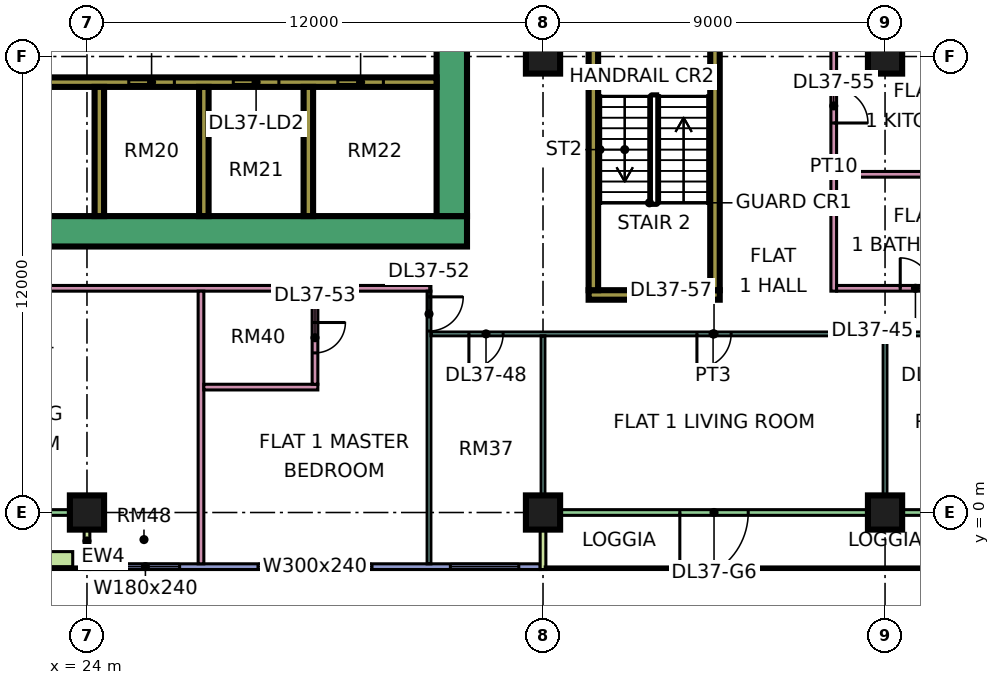
"""IFC4 building model, lengths in metres.
Left out: names, types, materials, properties, quantities, classifications, styles, units other than length and angle.
Written with IfcOpenShell. Run it as: python <this file> out.ifc"""

import sys

from ifc_helpers import new_model, si_unit, direction, frame, frame_2d, origin, origin_2d, place, context, subcontext, project, spatial, rectangle, extrude, element, fill, save


model = new_model("IFC4")
c1 = context("Model", 3, precision=1e-05, world=origin(), true_north=direction((0.0, 1.0)))
c2 = subcontext(c1, "Body", "Model", "MODEL_VIEW")
j1 = project(units=[si_unit("LENGTHUNIT", "METRE"), si_unit("PLANEANGLEUNIT", "RADIAN")], contexts=[c1])
p1 = place(None, origin())
s1 = spatial("IfcSite", under=j1, at=p1, CompositionType="ELEMENT")
p2 = place(p1, origin())
s2 = spatial("IfcBuilding", under=s1, at=p2, CompositionType="ELEMENT")
p3 = place(p2, frame((0.0, 0.0, 164.9)))
s3 = spatial("IfcBuildingStorey", under=s2, at=p3, CompositionType="ELEMENT", Elevation=164.9)
for number, where, z_axis, x_axis in (
    (1, (24.0, 0.0, 0.0), (0.0, 0.0, 1.0), (1.0, 0.0, 0.0)),
    (2, (36.0, 0.0, 0.0), (0.0, 0.0, 1.0), (1.0, 0.0, 0.0)),
    (3, (36.0, 12.0, 0.0), (0.0, 0.0, 1.0), (1.0, 0.0, 0.0)),
    (4, (45.0, 0.0, 0.0), (0.0, 0.0, 1.0), (1.0, 0.0, 0.0)),
    (5, (45.0, 12.0, 0.0), (0.0, 0.0, 1.0), (1.0, 0.0, 0.0)),
):
    element("IfcColumn", number, at=place(p3, frame(where, z_axis=z_axis, x_axis=x_axis)), inside=s3, PredefinedType="COLUMN", context=c2, shape_type="SweptSolid", body=[
        extrude(rectangle(XDim=0.9, YDim=0.9, at=origin_2d()), origin(), (0.0, 0.0, 1.0), 3.75),
    ])
p4 = place(p3, frame((9.0, 7.4, 0.0), z_axis=(0.0, 0.0, 1.0), x_axis=(1.0, 0.0, 0.0)))
e6 = element("IfcWall", 6, at=p4, inside=s3, PredefinedType="SHEAR", context=c2, shape_type="SweptSolid", body=[
    extrude(rectangle(XDim=25.0, YDim=0.8, at=frame_2d((12.5, 0.0))), origin(), (0.0, 0.0, 1.0), 3.75),
])
p5 = place(p3, frame((33.6, 7.8, 0.0), z_axis=(0.0, 0.0, 1.0), x_axis=(0.0, 1.0, 0.0)))
e7 = element("IfcWall", 7, at=p5, inside=s3, PredefinedType="SHEAR", context=c2, shape_type="SweptSolid", body=[
    extrude(rectangle(XDim=11.4, YDim=0.8, at=frame_2d((5.7, 0.0))), origin(), (0.0, 0.0, 1.0), 3.75),
])
p6 = place(p5, frame((5.4, 0.0, 0.0)))
e8 = element("IfcOpeningElement", 8, at=p6, cuts=e7, PredefinedType="OPENING", context=c2, shape_type="SweptSolid", body=[
    extrude(rectangle(XDim=1.8, YDim=2.4, at=frame_2d((0.9, 1.2))), frame((0.0, 0.41, 0.0), z_axis=(0.0, -1.0, 0.0), x_axis=(1.0, 0.0, 0.0)), (0.0, 0.0, 1.0), 0.82),
])
p7 = place(p3, frame((13.45, 11.325, 0.0), z_axis=(0.0, 0.0, 1.0), x_axis=(1.0, 0.0, 0.0)))
e9 = element("IfcWall", 9, at=p7, inside=s3, PredefinedType="SHEAR", context=c2, shape_type="SweptSolid", body=[
    extrude(rectangle(XDim=19.75, YDim=0.25, at=frame_2d((9.875, 0.0))), origin(), (0.0, 0.0, 1.0), 3.75),
])
p8 = place(p7, frame((11.65, 0.0, 0.0)))
e10 = element("IfcOpeningElement", 10, at=p8, cuts=e9, PredefinedType="OPENING", context=c2, shape_type="SweptSolid", body=[
    extrude(rectangle(XDim=1.2, YDim=2.2, at=frame_2d((0.6, 1.1))), frame((0.0, 0.135, 0.0), z_axis=(0.0, -1.0, 0.0), x_axis=(1.0, 0.0, 0.0)), (0.0, 0.0, 1.0), 0.27),
])
p9 = place(p7, frame((14.4, 0.0, 0.0)))
e11 = element("IfcOpeningElement", 11, at=p9, cuts=e9, PredefinedType="OPENING", context=c2, shape_type="SweptSolid", body=[
    extrude(rectangle(XDim=1.2, YDim=2.2, at=frame_2d((0.6, 1.1))), frame((0.0, 0.135, 0.0), z_axis=(0.0, -1.0, 0.0), x_axis=(1.0, 0.0, 0.0)), (0.0, 0.0, 1.0), 0.27),
])
p10 = place(p7, frame((17.15, 0.0, 0.0)))
e12 = element("IfcOpeningElement", 12, at=p10, cuts=e9, PredefinedType="OPENING", context=c2, shape_type="SweptSolid", body=[
    extrude(rectangle(XDim=1.2, YDim=2.2, at=frame_2d((0.6, 1.1))), frame((0.0, 0.135, 0.0), z_axis=(0.0, -1.0, 0.0), x_axis=(1.0, 0.0, 0.0)), (0.0, 0.0, 1.0), 0.27),
])
p11 = place(p7, frame((4.925, 0.0, 0.0)))
e13 = element("IfcOpeningElement", 13, at=p11, cuts=e9, PredefinedType="OPENING", context=c2, shape_type="SweptSolid", body=[
    extrude(rectangle(XDim=0.9, YDim=2.1, at=frame_2d((0.45, 1.05))), frame((0.0, 0.135, 0.0), z_axis=(0.0, -1.0, 0.0), x_axis=(1.0, 0.0, 0.0)), (0.0, 0.0, 1.0), 0.27),
])
for number, where, z_axis, x_axis in (
    (14, (24.325, 7.8, 0.0), (0.0, 0.0, 1.0), (0.0, 1.0, 0.0)),
    (15, (27.075, 7.8, 0.0), (0.0, 0.0, 1.0), (0.0, 1.0, 0.0)),
    (16, (29.825, 7.8, 0.0), (0.0, 0.0, 1.0), (0.0, 1.0, 0.0)),
):
    element("IfcWall", number, at=place(p3, frame(where, z_axis=z_axis, x_axis=x_axis)), inside=s3, PredefinedType="SHEAR", context=c2, shape_type="SweptSolid", body=[
        extrude(rectangle(XDim=3.4, YDim=0.25, at=frame_2d((1.7, 0.0))), origin(), (0.0, 0.0, 1.0), 3.75),
    ])
p12 = place(p3, frame((37.2, 5.725, 0.0), z_axis=(0.0, 0.0, 1.0), x_axis=(1.0, 0.0, 0.0)))
e17 = element("IfcWall", 17, at=p12, inside=s3, PredefinedType="SHEAR", context=c2, shape_type="SweptSolid", body=[
    extrude(rectangle(XDim=3.45, YDim=0.25, at=frame_2d((1.725, 0.0))), origin(), (0.0, 0.0, 1.0), 3.75),
])
for number, where, z_axis, x_axis in (
    (18, (37.325, 5.85, 0.0), (0.0, 0.0, 1.0), (0.0, 1.0, 0.0)),
    (19, (40.525, 5.85, 0.0), (0.0, 0.0, 1.0), (0.0, 1.0, 0.0)),
):
    element("IfcWall", number, at=place(p3, frame(where, z_axis=z_axis, x_axis=x_axis)), inside=s3, PredefinedType="SHEAR", context=c2, shape_type="SweptSolid", body=[
        extrude(rectangle(XDim=6.5, YDim=0.25, at=frame_2d((3.25, 0.0))), origin(), (0.0, 0.0, 1.0), 3.75),
    ])
p13 = place(p3, frame((12.575, 0.0, 0.0), z_axis=(0.0, 0.0, 1.0), x_axis=(1.0, 0.0, 0.0)))
e20 = element("IfcWall", 20, at=p13, inside=s3, PredefinedType="SOLIDWALL", context=c2, shape_type="SweptSolid", body=[
    extrude(rectangle(XDim=11.35, YDim=0.15, at=frame_2d((5.675, 0.0))), origin(), (0.0, 0.0, 1.0), 3.35),
])
p14 = place(p13, frame((0.613, 0.0, 0.0)))
e21 = element("IfcOpeningElement", 21, at=p14, cuts=e20, PredefinedType="OPENING", context=c2, shape_type="SweptSolid", body=[
    extrude(rectangle(XDim=1.2, YDim=2.4, at=frame_2d((0.6, 1.2))), frame((0.0, 0.085, 0.0), z_axis=(0.0, -1.0, 0.0), x_axis=(1.0, 0.0, 0.0)), (0.0, 0.0, 1.0), 0.17),
])
p15 = place(p13, frame((3.025, 0.0, 0.45)))
e22 = element("IfcOpeningElement", 22, at=p15, cuts=e20, PredefinedType="OPENING", context=c2, shape_type="SweptSolid", body=[
    extrude(rectangle(XDim=1.8, YDim=2.4, at=frame_2d((0.9, 1.2))), frame((0.0, 0.085, 0.0), z_axis=(0.0, -1.0, 0.0), x_axis=(1.0, 0.0, 0.0)), (0.0, 0.0, 1.0), 0.17),
])
p16 = place(p13, frame((6.65, 0.0, 0.45)))
e23 = element("IfcOpeningElement", 23, at=p16, cuts=e20, PredefinedType="OPENING", context=c2, shape_type="SweptSolid", body=[
    extrude(rectangle(XDim=3.0, YDim=2.4, at=frame_2d((1.5, 1.2))), frame((0.0, 0.085, 0.0), z_axis=(0.0, -1.0, 0.0), x_axis=(1.0, 0.0, 0.0)), (0.0, 0.0, 1.0), 0.17),
])
p17 = place(p3, frame((24.0, -1.5, 0.0), z_axis=(0.0, 0.0, 1.0), x_axis=(0.0, 1.0, 0.0)))
e24 = element("IfcWall", 24, at=p17, inside=s3, PredefinedType="SOLIDWALL", context=c2, shape_type="SweptSolid", body=[
    extrude(rectangle(XDim=1.5, YDim=0.15, at=frame_2d((0.75, 0.0))), origin(), (0.0, 0.0, 1.0), 3.35),
])
p18 = place(p3, frame((24.075, -1.425, 0.0), z_axis=(0.0, 0.0, 1.0), x_axis=(1.0, 0.0, 0.0)))
e25 = element("IfcWall", 25, at=p18, inside=s3, PredefinedType="SOLIDWALL", context=c2, shape_type="SweptSolid", body=[
    extrude(rectangle(XDim=11.85, YDim=0.15, at=frame_2d((5.925, 0.0))), origin(), (0.0, 0.0, 1.0), 3.35),
])
p19 = place(p18, frame((0.562, 0.0, 0.45)))
e26 = element("IfcOpeningElement", 26, at=p19, cuts=e25, PredefinedType="OPENING", context=c2, shape_type="SweptSolid", body=[
    extrude(rectangle(XDim=1.8, YDim=2.4, at=frame_2d((0.9, 1.2))), frame((0.0, 0.085, 0.0), z_axis=(0.0, -1.0, 0.0), x_axis=(1.0, 0.0, 0.0)), (0.0, 0.0, 1.0), 0.17),
])
p20 = place(p18, frame((4.425, 0.0, 0.45)))
e27 = element("IfcOpeningElement", 27, at=p20, cuts=e25, PredefinedType="OPENING", context=c2, shape_type="SweptSolid", body=[
    extrude(rectangle(XDim=3.0, YDim=2.4, at=frame_2d((1.5, 1.2))), frame((0.0, 0.085, 0.0), z_axis=(0.0, -1.0, 0.0), x_axis=(1.0, 0.0, 0.0)), (0.0, 0.0, 1.0), 0.17),
])
p21 = place(p18, frame((9.488, 0.0, 0.45)))
e28 = element("IfcOpeningElement", 28, at=p21, cuts=e25, PredefinedType="OPENING", context=c2, shape_type="SweptSolid", body=[
    extrude(rectangle(XDim=1.8, YDim=2.4, at=frame_2d((0.9, 1.2))), frame((0.0, 0.085, 0.0), z_axis=(0.0, -1.0, 0.0), x_axis=(1.0, 0.0, 0.0)), (0.0, 0.0, 1.0), 0.17),
])
p22 = place(p3, frame((36.075, 0.0, 0.0), z_axis=(0.0, 0.0, 1.0), x_axis=(1.0, 0.0, 0.0)))
e29 = element("IfcWall", 29, at=p22, inside=s3, PredefinedType="SOLIDWALL", context=c2, shape_type="SweptSolid", body=[
    extrude(rectangle(XDim=11.85, YDim=0.15, at=frame_2d((5.925, 0.0))), origin(), (0.0, 0.0, 1.0), 3.35),
])
p23 = place(p22, frame((3.525, 0.0, 0.0)))
e30 = element("IfcOpeningElement", 30, at=p23, cuts=e29, PredefinedType="OPENING", context=c2, shape_type="SweptSolid", body=[
    extrude(rectangle(XDim=1.8, YDim=2.4, at=frame_2d((0.9, 1.2))), frame((0.0, 0.085, 0.0), z_axis=(0.0, -1.0, 0.0), x_axis=(1.0, 0.0, 0.0)), (0.0, 0.0, 1.0), 0.17),
])
p24 = place(p22, frame((10.062, 0.0, 0.45)))
e31 = element("IfcOpeningElement", 31, at=p24, cuts=e29, PredefinedType="OPENING", context=c2, shape_type="SweptSolid", body=[
    extrude(rectangle(XDim=1.2, YDim=2.4, at=frame_2d((0.6, 1.2))), frame((0.0, 0.085, 0.0), z_axis=(0.0, -1.0, 0.0), x_axis=(1.0, 0.0, 0.0)), (0.0, 0.0, 1.0), 0.17),
])
p25 = place(p3, frame((36.0, -1.5, 0.0), z_axis=(0.0, 0.0, 1.0), x_axis=(0.0, 1.0, 0.0)))
e32 = element("IfcWall", 32, at=p25, inside=s3, PredefinedType="SOLIDWALL", context=c2, shape_type="SweptSolid", body=[
    extrude(rectangle(XDim=1.5, YDim=0.15, at=frame_2d((0.75, 0.0))), origin(), (0.0, 0.0, 1.0), 3.35),
])
p26 = place(p3, frame((12.875, -1.229, 0.0), z_axis=(0.0, 0.0, 1.0), x_axis=(1.0, 0.0, 0.0)))
e33 = element("IfcWall", 33, at=p26, inside=s3, PredefinedType="SOLIDWALL", context=c2, shape_type="SweptSolid", body=[
    extrude(rectangle(XDim=10.75, YDim=0.4, at=frame_2d((5.375, 0.0))), origin(), (0.0, 0.0, 1.0), 0.7),
])
p27 = place(p3, frame((11.95, 5.9, 0.0), z_axis=(0.0, 0.0, 1.0), x_axis=(1.0, 0.0, 0.0)))
e34 = element("IfcWall", 34, at=p27, inside=s3, PredefinedType="PARTITIONING", context=c2, shape_type="SweptSolid", body=[
    extrude(rectangle(XDim=21.1, YDim=0.15, at=frame_2d((10.55, 0.0))), origin(), (0.0, 0.0, 1.0), 3.35),
])
p28 = place(p27, frame((1.1, 0.0, 0.0)))
e35 = element("IfcOpeningElement", 35, at=p28, cuts=e34, PredefinedType="OPENING", context=c2, shape_type="SweptSolid", body=[
    extrude(rectangle(XDim=0.9, YDim=2.1, at=frame_2d((0.45, 1.05))), frame((0.0, 0.085, 0.0), z_axis=(0.0, -1.0, 0.0), x_axis=(1.0, 0.0, 0.0)), (0.0, 0.0, 1.0), 0.17),
])
p29 = place(p27, frame((4.1, 0.0, 0.0)))
e36 = element("IfcOpeningElement", 36, at=p29, cuts=e34, PredefinedType="OPENING", context=c2, shape_type="SweptSolid", body=[
    extrude(rectangle(XDim=0.9, YDim=2.1, at=frame_2d((0.45, 1.05))), frame((0.0, 0.085, 0.0), z_axis=(0.0, -1.0, 0.0), x_axis=(1.0, 0.0, 0.0)), (0.0, 0.0, 1.0), 0.17),
])
p30 = place(p27, frame((10.1, 0.0, 0.0)))
e37 = element("IfcOpeningElement", 37, at=p30, cuts=e34, PredefinedType="OPENING", context=c2, shape_type="SweptSolid", body=[
    extrude(rectangle(XDim=0.9, YDim=2.1, at=frame_2d((0.45, 1.05))), frame((0.0, 0.085, 0.0), z_axis=(0.0, -1.0, 0.0), x_axis=(1.0, 0.0, 0.0)), (0.0, 0.0, 1.0), 0.17),
])
p31 = place(p3, frame((27.0, -1.35, 0.0), z_axis=(0.0, 0.0, 1.0), x_axis=(0.0, 1.0, 0.0)))
e38 = element("IfcWall", 38, at=p31, inside=s3, PredefinedType="PARTITIONING", context=c2, shape_type="SweptSolid", body=[
    extrude(rectangle(XDim=7.175, YDim=0.15, at=frame_2d((3.587, 0.0))), origin(), (0.0, 0.0, 1.0), 3.35),
])
p32 = place(p3, frame((27.075, 3.3, 0.0), z_axis=(0.0, 0.0, 1.0), x_axis=(1.0, 0.0, 0.0)))
e39 = element("IfcWall", 39, at=p32, inside=s3, PredefinedType="PARTITIONING", context=c2, shape_type="SweptSolid", body=[
    extrude(rectangle(XDim=3.0, YDim=0.15, at=frame_2d((1.5, 0.0))), origin(), (0.0, 0.0, 1.0), 3.35),
])
p33 = place(p3, frame((30.0, 3.375, 0.0), z_axis=(0.0, 0.0, 1.0), x_axis=(0.0, 1.0, 0.0)))
e40 = element("IfcWall", 40, at=p33, inside=s3, PredefinedType="PARTITIONING", context=c2, shape_type="SweptSolid", body=[
    extrude(rectangle(XDim=2.45, YDim=0.15, at=frame_2d((1.225, 0.0))), origin(), (0.0, 0.0, 1.0), 3.35),
])
p34 = place(p33, frame((0.825, 0.0, 0.0)))
e41 = element("IfcOpeningElement", 41, at=p34, cuts=e40, PredefinedType="OPENING", context=c2, shape_type="SweptSolid", body=[
    extrude(rectangle(XDim=0.8, YDim=2.1, at=frame_2d((0.4, 1.05))), frame((0.0, 0.085, 0.0), z_axis=(0.0, -1.0, 0.0), x_axis=(1.0, 0.0, 0.0)), (0.0, 0.0, 1.0), 0.17),
])
p35 = place(p3, frame((33.0, -1.351, 0.0), z_axis=(0.0, 0.0, 1.0), x_axis=(0.0, 1.0, 0.0)))
e42 = element("IfcWall", 42, at=p35, inside=s3, PredefinedType="PARTITIONING", context=c2, shape_type="SweptSolid", body=[
    extrude(rectangle(XDim=7.176, YDim=0.1, at=frame_2d((3.588, 0.0))), origin(), (0.0, 0.0, 1.0), 3.35),
])
p36 = place(p35, frame((6.126, 0.0, 0.0)))
e43 = element("IfcOpeningElement", 43, at=p36, cuts=e42, PredefinedType="OPENING", context=c2, shape_type="SweptSolid", body=[
    extrude(rectangle(XDim=0.9, YDim=2.1, at=frame_2d((0.45, 1.05))), frame((0.0, 0.06, 0.0), z_axis=(0.0, -1.0, 0.0), x_axis=(1.0, 0.0, 0.0)), (0.0, 0.0, 1.0), 0.12),
])
p37 = place(p3, frame((33.05, 4.7, 0.0), z_axis=(0.0, 0.0, 1.0), x_axis=(1.0, 0.0, 0.0)))
e44 = element("IfcWall", 44, at=p37, inside=s3, PredefinedType="PARTITIONING", context=c2, shape_type="SweptSolid", body=[
    extrude(rectangle(XDim=14.85, YDim=0.1, at=frame_2d((7.425, 0.0))), origin(), (0.0, 0.0, 1.0), 3.35),
])
p38 = place(p37, frame((1.0, 0.0, 0.0)))
e45 = element("IfcOpeningElement", 45, at=p38, cuts=e44, PredefinedType="OPENING", context=c2, shape_type="SweptSolid", body=[
    extrude(rectangle(XDim=0.9, YDim=2.1, at=frame_2d((0.45, 1.05))), frame((0.0, 0.06, 0.0), z_axis=(0.0, -1.0, 0.0), x_axis=(1.0, 0.0, 0.0)), (0.0, 0.0, 1.0), 0.12),
])
p39 = place(p37, frame((13.0, 0.0, 0.0)))
e46 = element("IfcOpeningElement", 46, at=p39, cuts=e44, PredefinedType="OPENING", context=c2, shape_type="SweptSolid", body=[
    extrude(rectangle(XDim=0.9, YDim=2.1, at=frame_2d((0.45, 1.05))), frame((0.0, 0.06, 0.0), z_axis=(0.0, -1.0, 0.0), x_axis=(1.0, 0.0, 0.0)), (0.0, 0.0, 1.0), 0.12),
])
p40 = place(p37, frame((7.0, 0.0, 0.0)))
e47 = element("IfcOpeningElement", 47, at=p40, cuts=e44, PredefinedType="OPENING", context=c2, shape_type="SweptSolid", body=[
    extrude(rectangle(XDim=0.9, YDim=2.1, at=frame_2d((0.45, 1.05))), frame((0.0, 0.06, 0.0), z_axis=(0.0, -1.0, 0.0), x_axis=(1.0, 0.0, 0.0)), (0.0, 0.0, 1.0), 0.12),
])
p41 = place(p3, frame((36.0, 0.0, 0.0), z_axis=(0.0, 0.0, 1.0), x_axis=(0.0, 1.0, 0.0)))
e48 = element("IfcWall", 48, at=p41, inside=s3, PredefinedType="PARTITIONING", context=c2, shape_type="SweptSolid", body=[
    extrude(rectangle(XDim=4.65, YDim=0.1, at=frame_2d((2.325, 0.0))), origin(), (0.0, 0.0, 1.0), 3.35),
])
p42 = place(p3, frame((43.65, 5.825, 0.0), z_axis=(0.0, 0.0, 1.0), x_axis=(0.0, 1.0, 0.0)))
e49 = element("IfcWall", 49, at=p42, inside=s3, PredefinedType="PARTITIONING", context=c2, shape_type="SweptSolid", body=[
    extrude(rectangle(XDim=6.525, YDim=0.15, at=frame_2d((3.263, 0.0))), origin(), (0.0, 0.0, 1.0), 3.35),
])
p43 = place(p42, frame((4.425, 0.0, 0.0)))
e50 = element("IfcOpeningElement", 50, at=p43, cuts=e49, PredefinedType="OPENING", context=c2, shape_type="SweptSolid", body=[
    extrude(rectangle(XDim=0.9, YDim=2.1, at=frame_2d((0.45, 1.05))), frame((0.0, 0.085, 0.0), z_axis=(0.0, -1.0, 0.0), x_axis=(1.0, 0.0, 0.0)), (0.0, 0.0, 1.0), 0.17),
])
p44 = place(p3, frame((43.725, 5.9, 0.0), z_axis=(0.0, 0.0, 1.0), x_axis=(1.0, 0.0, 0.0)))
e51 = element("IfcWall", 51, at=p44, inside=s3, PredefinedType="PARTITIONING", context=c2, shape_type="SweptSolid", body=[
    extrude(rectangle(XDim=4.175, YDim=0.15, at=frame_2d((2.087, 0.0))), origin(), (0.0, 0.0, 1.0), 3.35),
])
p45 = place(p44, frame((1.675, 0.0, 0.0)))
e52 = element("IfcOpeningElement", 52, at=p45, cuts=e51, PredefinedType="OPENING", context=c2, shape_type="SweptSolid", body=[
    extrude(rectangle(XDim=0.8, YDim=2.1, at=frame_2d((0.4, 1.05))), frame((0.0, 0.085, 0.0), z_axis=(0.0, -1.0, 0.0), x_axis=(1.0, 0.0, 0.0)), (0.0, 0.0, 1.0), 0.17),
])
p46 = place(p3, frame((43.725, 8.9, 0.0), z_axis=(0.0, 0.0, 1.0), x_axis=(1.0, 0.0, 0.0)))
e53 = element("IfcWall", 53, at=p46, inside=s3, PredefinedType="PARTITIONING", context=c2, shape_type="SweptSolid", body=[
    extrude(rectangle(XDim=4.175, YDim=0.15, at=frame_2d((2.087, 0.0))), origin(), (0.0, 0.0, 1.0), 3.35),
])
p47 = place(p3, frame((45.0, 0.074, 0.0), z_axis=(0.0, 0.0, 1.0), x_axis=(0.0, 1.0, 0.0)))
e54 = element("IfcWall", 54, at=p47, inside=s3, PredefinedType="PARTITIONING", context=c2, shape_type="SweptSolid", body=[
    extrude(rectangle(XDim=4.576, YDim=0.1, at=frame_2d((2.288, 0.0))), origin(), (0.0, 0.0, 1.0), 3.35),
])
p48 = place(p19, origin())
e55 = element("IfcWindow", 55, at=p48, inside=s3, PartitioningType="SINGLE_PANEL", PredefinedType="WINDOW", context=c2, shape_type="SweptSolid", body=[
    extrude(rectangle(XDim=1.8, YDim=2.4, at=frame_2d((0.9, 1.2))), frame((0.0, 0.03, 0.0), z_axis=(0.0, -1.0, 0.0), x_axis=(1.0, 0.0, 0.0)), (0.0, 0.0, 1.0), 0.06),
])
fill(e26, e55)
p49 = place(p20, origin())
e56 = element("IfcWindow", 56, at=p49, inside=s3, PartitioningType="SINGLE_PANEL", PredefinedType="WINDOW", context=c2, shape_type="SweptSolid", body=[
    extrude(rectangle(XDim=3.0, YDim=2.4, at=frame_2d((1.5, 1.2))), frame((0.0, 0.03, 0.0), z_axis=(0.0, -1.0, 0.0), x_axis=(1.0, 0.0, 0.0)), (0.0, 0.0, 1.0), 0.06),
])
fill(e27, e56)
p50 = place(p21, origin())
e57 = element("IfcWindow", 57, at=p50, inside=s3, PartitioningType="SINGLE_PANEL", PredefinedType="WINDOW", context=c2, shape_type="SweptSolid", body=[
    extrude(rectangle(XDim=1.8, YDim=2.4, at=frame_2d((0.9, 1.2))), frame((0.0, 0.03, 0.0), z_axis=(0.0, -1.0, 0.0), x_axis=(1.0, 0.0, 0.0)), (0.0, 0.0, 1.0), 0.06),
])
fill(e28, e57)
p51 = place(p23, frame((1.8, 0.0, 0.0), z_axis=(0.0, 0.0, 1.0), x_axis=(-1.0, 0.0, 0.0)))
e58 = element("IfcDoor", 58, at=p51, inside=s3, OperationType="DOUBLE_DOOR_SINGLE_SWING", PredefinedType="DOOR", context=c2, shape_type="SweptSolid", body=[
    extrude(rectangle(XDim=1.8, YDim=2.4, at=frame_2d((0.9, 1.2))), frame((0.0, 0.025, 0.0), z_axis=(0.0, -1.0, 0.0), x_axis=(1.0, 0.0, 0.0)), (0.0, 0.0, 1.0), 0.05),
])
fill(e30, e58)
p52 = place(p8, origin())
e59 = element("IfcDoor", 59, at=p52, inside=s3, OperationType="DOUBLE_DOOR_SLIDING", PredefinedType="DOOR", context=c2, shape_type="SweptSolid", body=[
    extrude(rectangle(XDim=1.2, YDim=2.2, at=frame_2d((0.6, 1.1))), frame((0.0, 0.025, 0.0), z_axis=(0.0, -1.0, 0.0), x_axis=(1.0, 0.0, 0.0)), (0.0, 0.0, 1.0), 0.05),
])
fill(e10, e59)
p53 = place(p9, origin())
e60 = element("IfcDoor", 60, at=p53, inside=s3, OperationType="DOUBLE_DOOR_SLIDING", PredefinedType="DOOR", context=c2, shape_type="SweptSolid", body=[
    extrude(rectangle(XDim=1.2, YDim=2.2, at=frame_2d((0.6, 1.1))), frame((0.0, 0.025, 0.0), z_axis=(0.0, -1.0, 0.0), x_axis=(1.0, 0.0, 0.0)), (0.0, 0.0, 1.0), 0.05),
])
fill(e11, e60)
p54 = place(p10, origin())
e61 = element("IfcDoor", 61, at=p54, inside=s3, OperationType="DOUBLE_DOOR_SLIDING", PredefinedType="DOOR", context=c2, shape_type="SweptSolid", body=[
    extrude(rectangle(XDim=1.2, YDim=2.2, at=frame_2d((0.6, 1.1))), frame((0.0, 0.025, 0.0), z_axis=(0.0, -1.0, 0.0), x_axis=(1.0, 0.0, 0.0)), (0.0, 0.0, 1.0), 0.05),
])
fill(e12, e61)
p55 = place(p45, origin())
e62 = element("IfcDoor", 62, at=p55, inside=s3, OperationType="SINGLE_SWING_LEFT", PredefinedType="DOOR", context=c2, shape_type="SweptSolid", body=[
    extrude(rectangle(XDim=0.8, YDim=2.1, at=frame_2d((0.4, 1.05))), frame((0.0, 0.025, 0.0), z_axis=(0.0, -1.0, 0.0), x_axis=(1.0, 0.0, 0.0)), (0.0, 0.0, 1.0), 0.05),
])
fill(e52, e62)
p56 = place(p38, frame((0.9, 0.0, 0.0), z_axis=(0.0, 0.0, 1.0), x_axis=(-1.0, 0.0, 0.0)))
e63 = element("IfcDoor", 63, at=p56, inside=s3, OperationType="SINGLE_SWING_LEFT", PredefinedType="DOOR", context=c2, shape_type="SweptSolid", body=[
    extrude(rectangle(XDim=0.9, YDim=2.1, at=frame_2d((0.45, 1.05))), frame((0.0, 0.025, 0.0), z_axis=(0.0, -1.0, 0.0), x_axis=(1.0, 0.0, 0.0)), (0.0, 0.0, 1.0), 0.05),
])
fill(e45, e63)
p57 = place(p36, origin())
e64 = element("IfcDoor", 64, at=p57, inside=s3, OperationType="SINGLE_SWING_RIGHT", PredefinedType="DOOR", context=c2, shape_type="SweptSolid", body=[
    extrude(rectangle(XDim=0.9, YDim=2.1, at=frame_2d((0.45, 1.05))), frame((0.0, 0.025, 0.0), z_axis=(0.0, -1.0, 0.0), x_axis=(1.0, 0.0, 0.0)), (0.0, 0.0, 1.0), 0.05),
])
fill(e43, e64)
p58 = place(p34, origin())
e65 = element("IfcDoor", 65, at=p58, inside=s3, OperationType="SINGLE_SWING_RIGHT", PredefinedType="DOOR", context=c2, shape_type="SweptSolid", body=[
    extrude(rectangle(XDim=0.8, YDim=2.1, at=frame_2d((0.4, 1.05))), frame((0.0, 0.025, 0.0), z_axis=(0.0, -1.0, 0.0), x_axis=(1.0, 0.0, 0.0)), (0.0, 0.0, 1.0), 0.05),
])
fill(e41, e65)
p59 = place(p43, frame((0.9, 0.0, 0.0), z_axis=(0.0, 0.0, 1.0), x_axis=(-1.0, 0.0, 0.0)))
e66 = element("IfcDoor", 66, at=p59, inside=s3, OperationType="SINGLE_SWING_LEFT", PredefinedType="DOOR", context=c2, shape_type="SweptSolid", body=[
    extrude(rectangle(XDim=0.9, YDim=2.1, at=frame_2d((0.45, 1.05))), frame((0.0, 0.025, 0.0), z_axis=(0.0, -1.0, 0.0), x_axis=(1.0, 0.0, 0.0)), (0.0, 0.0, 1.0), 0.05),
])
fill(e50, e66)
p60 = place(p40, frame((0.9, 0.0, 0.0), z_axis=(0.0, 0.0, 1.0), x_axis=(-1.0, 0.0, 0.0)))
e67 = element("IfcDoor", 67, at=p60, inside=s3, OperationType="SINGLE_SWING_LEFT", PredefinedType="DOOR", context=c2, shape_type="SweptSolid", body=[
    extrude(rectangle(XDim=0.9, YDim=2.1, at=frame_2d((0.45, 1.05))), frame((0.0, 0.025, 0.0), z_axis=(0.0, -1.0, 0.0), x_axis=(1.0, 0.0, 0.0)), (0.0, 0.0, 1.0), 0.05),
])
fill(e47, e67)
save(model, sys.argv[1])
